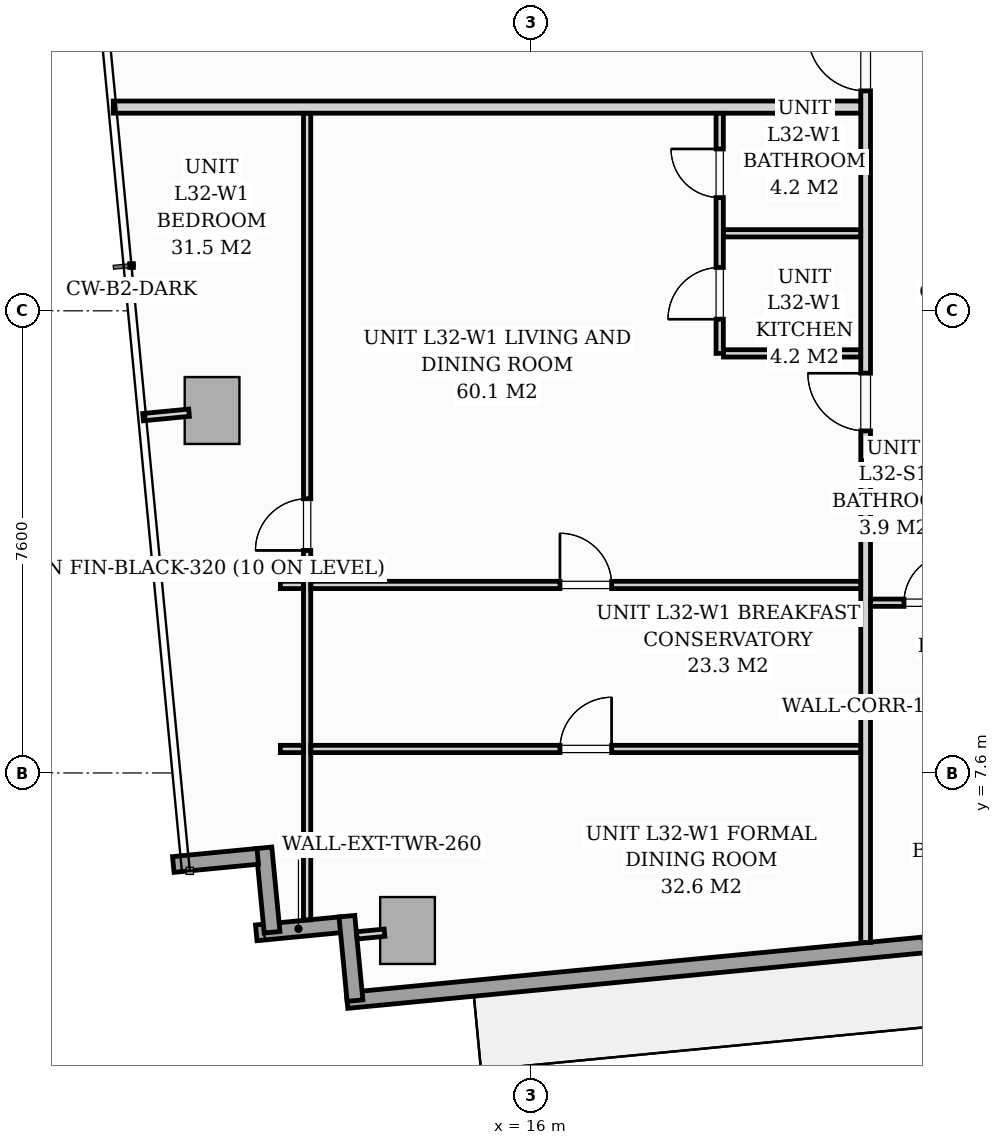
"""IFC4 building model, lengths in metres.
Left out: names, types, materials, properties, quantities, classifications, styles, units other than length and angle.
Written with IfcOpenShell. Run it as: python <this file> out.ifc"""

import sys

from ifc_helpers import new_model, si_unit, direction, frame, frame_2d, origin, origin_2d, place, context, subcontext, project, spatial, rectangle, extrude, source, transform, mapped, element, fill, save


model = new_model("IFC4")
c1 = context("Model", 3, precision=1e-05, world=origin(), true_north=direction((0.0, 1.0)))
c2 = subcontext(c1, "Body", "Model", "MODEL_VIEW")
j1 = project(units=[si_unit("LENGTHUNIT", "METRE"), si_unit("PLANEANGLEUNIT", "RADIAN")], contexts=[c1])
p1 = place(None, origin())
s1 = spatial("IfcSite", under=j1, at=p1, CompositionType="ELEMENT")
p2 = place(p1, origin())
s2 = spatial("IfcBuilding", under=s1, at=p2, CompositionType="ELEMENT")
p3 = place(p2, frame((0.0, 0.0, 113.0)))
s3 = spatial("IfcBuildingStorey", under=s2, at=p3, CompositionType="ELEMENT", Elevation=113.0)
m1 = source(origin(), c2, "Body", "SweptSolid", [
    extrude(rectangle(XDim=0.9, YDim=1.1, at=origin_2d()), origin(), (0.0, 0.0, 1.0), 3.196),
])
for number, where, z_axis, x_axis in (
    (1, (13.966, 5.01, 0.002), (0.0, 0.0, 1.0), (0.995, 0.096, 0.0)),
    (2, (10.752, 13.561, 0.002), (0.0, 0.0, 1.0), (0.995, 0.096, 0.0)),
):
    element("IfcColumn", number, at=place(p3, frame(where, z_axis=z_axis, x_axis=x_axis)), inside=s3, PredefinedType="COLUMN", context=c2, shape_type="MappedRepresentation", body=[
        mapped(m1, transform((0.0, 0.0, 0.0), scale=1.0)),
    ])
for number, where, z_axis, x_axis in (
    (3, (12.867, 5.104, 0.0), (0.0, 0.0, 1.0), (-0.995, -0.096, 0.0)),
    (4, (11.739, 4.981, 0.0), (0.0, 0.0, 1.0), (-0.096, 0.995, 0.0)),
):
    element("IfcWall", number, at=place(p3, frame(where, z_axis=z_axis, x_axis=x_axis)), inside=s3, PredefinedType="STANDARD", context=c2, shape_type="SweptSolid", body=[
        extrude(rectangle(XDim=1.395, YDim=0.26, at=frame_2d((0.697, 0.0))), origin(), (0.0, 0.0, 1.0), 2.94),
    ])
p4 = place(p3, frame((11.503, 6.229, 0.0), z_axis=(0.0, 0.0, 1.0), x_axis=(-0.995391056452, -0.09589913835, 0.0)))
e5 = element("IfcWall", 5, at=p4, inside=s3, PredefinedType="STANDARD", context=c2, shape_type="SweptSolid", body=[
    extrude(rectangle(XDim=1.395, YDim=0.26, at=frame_2d((0.698, 0.0))), origin(), (0.0, 0.0, 1.0), 2.94),
])
p5 = place(p3, frame((31.994, 5.69, 0.0), z_axis=(0.0, 0.0, 1.0), x_axis=(-0.995396521236, -0.095842399342, 0.0)))
e6 = element("IfcWall", 6, at=p5, inside=s3, PredefinedType="STANDARD", context=c2, shape_type="SweptSolid", body=[
    extrude(rectangle(XDim=19.11, YDim=0.26, at=frame_2d((9.555, 0.0))), origin(), (0.0, 0.0, 1.0), 2.94),
])
p6 = place(p5, frame((7.77, 0.0, 0.0)))
e7 = element("IfcOpeningElement", 7, at=p6, cuts=e6, PredefinedType="OPENING", context=c2, shape_type="SweptSolid", body=[
    extrude(rectangle(XDim=1.8, YDim=2.06, at=frame_2d((0.9, 1.03))), frame((0.0, 0.14, 0.0), z_axis=(0.0, -1.0, 0.0), x_axis=(1.0, 0.0, 0.0)), (0.0, 0.0, 1.0), 0.28),
])
p7 = place(p5, frame((2.5, 0.0, 0.65)))
e8 = element("IfcOpeningElement", 8, at=p7, cuts=e6, PredefinedType="OPENING", context=c2, shape_type="SweptSolid", body=[
    extrude(rectangle(XDim=1.6, YDim=1.5, at=frame_2d((0.8, 0.75))), frame((0.0, 0.14, 0.0), z_axis=(0.0, -1.0, 0.0), x_axis=(1.0, 0.0, 0.0)), (0.0, 0.0, 1.0), 0.28),
])
p8 = place(p3, frame((13.103, 3.856, 0.0), z_axis=(0.0, 0.0, 1.0), x_axis=(-0.09589913835, 0.995391056452, 0.0)))
e9 = element("IfcWall", 9, at=p8, inside=s3, PredefinedType="STANDARD", context=c2, shape_type="SweptSolid", body=[
    extrude(rectangle(XDim=1.395, YDim=0.26, at=frame_2d((0.698, 0.0))), origin(), (0.0, 0.0, 1.0), 2.94),
])
p9 = place(p3, frame((21.5, 12.65, 0.0), z_axis=(0.0, 0.0, 1.0), x_axis=(1.0, 0.0, 0.0)))
e10 = element("IfcWall", 10, at=p9, inside=s3, PredefinedType="PARTITIONING", context=c2, shape_type="SweptSolid", body=[
    extrude(rectangle(XDim=26.2, YDim=0.16, at=frame_2d((13.1, 0.0))), origin(), (0.0, 0.0, 1.0), 2.94),
])
p10 = place(p9, frame((5.927, 0.0, 0.0)))
e11 = element("IfcOpeningElement", 11, at=p10, cuts=e10, PredefinedType="OPENING", context=c2, shape_type="SweptSolid", body=[
    extrude(rectangle(XDim=0.95, YDim=2.06, at=frame_2d((0.475, 1.03))), frame((0.0, 0.09, 0.0), z_axis=(0.0, -1.0, 0.0), x_axis=(1.0, 0.0, 0.0)), (0.0, 0.0, 1.0), 0.18),
])
p11 = place(p9, frame((10.575, 0.0, 0.0)))
e12 = element("IfcOpeningElement", 12, at=p11, cuts=e10, PredefinedType="OPENING", context=c2, shape_type="SweptSolid", body=[
    extrude(rectangle(XDim=0.95, YDim=2.06, at=frame_2d((0.475, 1.03))), frame((0.0, 0.09, 0.0), z_axis=(0.0, -1.0, 0.0), x_axis=(1.0, 0.0, 0.0)), (0.0, 0.0, 1.0), 0.18),
])
p12 = place(p9, frame((19.322, 0.0, 0.0)))
e13 = element("IfcOpeningElement", 13, at=p12, cuts=e10, PredefinedType="OPENING", context=c2, shape_type="SweptSolid", body=[
    extrude(rectangle(XDim=0.95, YDim=2.06, at=frame_2d((0.475, 1.03))), frame((0.0, 0.09, 0.0), z_axis=(0.0, -1.0, 0.0), x_axis=(1.0, 0.0, 0.0)), (0.0, 0.0, 1.0), 0.18),
])
p13 = place(p3, frame((21.5, 4.812, 0.0), z_axis=(0.0, 0.0, 1.0), x_axis=(0.0, 1.0, 0.0)))
e14 = element("IfcWall", 14, at=p13, inside=s3, PredefinedType="PARTITIONING", context=c2, shape_type="SweptSolid", body=[
    extrude(rectangle(XDim=7.756, YDim=0.16, at=frame_2d((3.878, 0.0))), origin(), (0.0, 0.0, 1.0), 2.94),
])
p14 = place(p3, frame((21.5, 12.732, 0.0), z_axis=(0.0, 0.0, 1.0), x_axis=(0.0, 1.0, 0.0)))
e15 = element("IfcWall", 15, at=p14, inside=s3, PredefinedType="PARTITIONING", context=c2, shape_type="SweptSolid", body=[
    extrude(rectangle(XDim=11.647, YDim=0.16, at=frame_2d((5.823, 0.0))), origin(), (0.0, 0.0, 1.0), 2.94),
])
p15 = place(p14, frame((0.493, 0.0, 0.0)))
e16 = element("IfcOpeningElement", 16, at=p15, cuts=e15, PredefinedType="OPENING", context=c2, shape_type="SweptSolid", body=[
    extrude(rectangle(XDim=0.95, YDim=2.06, at=frame_2d((0.475, 1.03))), frame((0.0, 0.09, 0.0), z_axis=(0.0, -1.0, 0.0), x_axis=(1.0, 0.0, 0.0)), (0.0, 0.0, 1.0), 0.18),
])
p16 = place(p14, frame((6.085, 0.0, 0.0)))
e17 = element("IfcOpeningElement", 17, at=p16, cuts=e15, PredefinedType="OPENING", context=c2, shape_type="SweptSolid", body=[
    extrude(rectangle(XDim=0.95, YDim=2.06, at=frame_2d((0.475, 1.03))), frame((0.0, 0.09, 0.0), z_axis=(0.0, -1.0, 0.0), x_axis=(1.0, 0.0, 0.0)), (0.0, 0.0, 1.0), 0.18),
])
p17 = place(p3, frame((21.582, 10.4, 0.0), z_axis=(0.0, 0.0, 1.0), x_axis=(1.0, 0.0, 0.0)))
e18 = element("IfcWall", 18, at=p17, inside=s3, PredefinedType="PARTITIONING", context=c2, shape_type="SweptSolid", body=[
    extrude(rectangle(XDim=4.098, YDim=0.12, at=frame_2d((2.049, 0.0))), origin(), (0.0, 0.0, 1.0), 2.94),
])
p18 = place(p17, frame((0.548, 0.0, 0.0)))
e19 = element("IfcOpeningElement", 19, at=p18, cuts=e18, PredefinedType="OPENING", context=c2, shape_type="SweptSolid", body=[
    extrude(rectangle(XDim=0.8, YDim=2.02, at=frame_2d((0.4, 1.01))), frame((0.0, 0.07, 0.0), z_axis=(0.0, -1.0, 0.0), x_axis=(1.0, 0.0, 0.0)), (0.0, 0.0, 1.0), 0.14),
])
p19 = place(p17, frame((2.573, 0.0, 0.0)))
e20 = element("IfcOpeningElement", 20, at=p19, cuts=e18, PredefinedType="OPENING", context=c2, shape_type="SweptSolid", body=[
    extrude(rectangle(XDim=0.85, YDim=2.05, at=frame_2d((0.425, 1.025))), frame((0.0, 0.07, 0.0), z_axis=(0.0, -1.0, 0.0), x_axis=(1.0, 0.0, 0.0)), (0.0, 0.0, 1.0), 0.14),
])
p20 = place(p3, frame((9.126, 18.55, 0.0), z_axis=(0.0, 0.0, 1.0), x_axis=(1.0, 0.0, 0.0)))
e21 = element("IfcWall", 21, at=p20, inside=s3, PredefinedType="PARTITIONING", context=c2, shape_type="SweptSolid", body=[
    extrude(rectangle(XDim=12.292, YDim=0.2, at=frame_2d((6.146, 0.0))), origin(), (0.0, 0.0, 1.0), 2.94),
])
p21 = place(p3, frame((19.1, 14.5, 0.0), z_axis=(0.0, 0.0, 1.0), x_axis=(0.0, 1.0, 0.0)))
e22 = element("IfcWall", 22, at=p21, inside=s3, PredefinedType="PARTITIONING", context=c2, shape_type="SweptSolid", body=[
    extrude(rectangle(XDim=3.948, YDim=0.12, at=frame_2d((1.974, 0.0))), origin(), (0.0, 0.0, 1.0), 2.94),
])
p22 = place(p21, frame((0.563, 0.0, 0.0)))
e23 = element("IfcOpeningElement", 23, at=p22, cuts=e22, PredefinedType="OPENING", context=c2, shape_type="SweptSolid", body=[
    extrude(rectangle(XDim=0.85, YDim=2.05, at=frame_2d((0.425, 1.025))), frame((0.0, 0.07, 0.0), z_axis=(0.0, -1.0, 0.0), x_axis=(1.0, 0.0, 0.0)), (0.0, 0.0, 1.0), 0.14),
])
p23 = place(p21, frame((2.562, 0.0, 0.0)))
e24 = element("IfcOpeningElement", 24, at=p23, cuts=e22, PredefinedType="OPENING", context=c2, shape_type="SweptSolid", body=[
    extrude(rectangle(XDim=0.8, YDim=2.02, at=frame_2d((0.4, 1.01))), frame((0.0, 0.07, 0.0), z_axis=(0.0, -1.0, 0.0), x_axis=(1.0, 0.0, 0.0)), (0.0, 0.0, 1.0), 0.14),
])
for number, where, z_axis, x_axis in (
    (25, (19.162, 16.475, 0.0), (0.0, 0.0, 1.0), (1.0, 0.0, 0.0)),
    (26, (19.162, 14.5, 0.0), (0.0, 0.0, 1.0), (1.0, 0.0, 0.0)),
):
    element("IfcWall", number, at=place(p3, frame(where, z_axis=z_axis, x_axis=x_axis)), inside=s3, PredefinedType="PARTITIONING", context=c2, shape_type="SweptSolid", body=[
        extrude(rectangle(XDim=2.256, YDim=0.12, at=frame_2d((1.128, 0.0))), origin(), (0.0, 0.0, 1.0), 2.94),
    ])
p24 = place(p3, frame((12.315, 5.184, 0.0), z_axis=(0.0, 0.0, 1.0), x_axis=(0.0, 1.0, 0.0)))
e27 = element("IfcWall", 27, at=p24, inside=s3, PredefinedType="PARTITIONING", context=c2, shape_type="SweptSolid", body=[
    extrude(rectangle(XDim=13.264, YDim=0.12, at=frame_2d((6.632, 0.0))), origin(), (0.0, 0.0, 1.0), 2.94),
])
p25 = place(p24, frame((6.076, 0.0, 0.0)))
e28 = element("IfcOpeningElement", 28, at=p25, cuts=e27, PredefinedType="OPENING", context=c2, shape_type="SweptSolid", body=[
    extrude(rectangle(XDim=0.85, YDim=2.05, at=frame_2d((0.425, 1.025))), frame((0.0, 0.07, 0.0), z_axis=(0.0, -1.0, 0.0), x_axis=(1.0, 0.0, 0.0)), (0.0, 0.0, 1.0), 0.14),
])
p26 = place(p3, frame((11.875, 7.995, 0.0), z_axis=(0.0, 0.0, 1.0), x_axis=(1.0, 0.0, 0.0)))
e29 = element("IfcWall", 29, at=p26, inside=s3, PredefinedType="PARTITIONING", context=c2, shape_type="SweptSolid", body=[
    extrude(rectangle(XDim=0.378, YDim=0.12, at=frame_2d((0.189, 0.0))), origin(), (0.0, 0.0, 1.0), 2.94),
])
p27 = place(p3, frame((12.377, 7.995, 0.0), z_axis=(0.0, 0.0, 1.0), x_axis=(1.0, 0.0, 0.0)))
e30 = element("IfcWall", 30, at=p27, inside=s3, PredefinedType="PARTITIONING", context=c2, shape_type="SweptSolid", body=[
    extrude(rectangle(XDim=9.041, YDim=0.12, at=frame_2d((4.521, 0.0))), origin(), (0.0, 0.0, 1.0), 2.94),
])
p28 = place(p27, frame((4.096, 0.0, 0.0)))
e31 = element("IfcOpeningElement", 31, at=p28, cuts=e30, PredefinedType="OPENING", context=c2, shape_type="SweptSolid", body=[
    extrude(rectangle(XDim=0.85, YDim=2.05, at=frame_2d((0.425, 1.025))), frame((0.0, 0.07, 0.0), z_axis=(0.0, -1.0, 0.0), x_axis=(1.0, 0.0, 0.0)), (0.0, 0.0, 1.0), 0.14),
])
p29 = place(p3, frame((11.875, 10.692, 0.0), z_axis=(0.0, 0.0, 1.0), x_axis=(1.0, 0.0, 0.0)))
e32 = element("IfcWall", 32, at=p29, inside=s3, PredefinedType="PARTITIONING", context=c2, shape_type="SweptSolid", body=[
    extrude(rectangle(XDim=0.378, YDim=0.12, at=frame_2d((0.189, 0.0))), origin(), (0.0, 0.0, 1.0), 2.94),
])
p30 = place(p3, frame((12.377, 10.692, 0.0), z_axis=(0.0, 0.0, 1.0), x_axis=(1.0, 0.0, 0.0)))
e33 = element("IfcWall", 33, at=p30, inside=s3, PredefinedType="PARTITIONING", context=c2, shape_type="SweptSolid", body=[
    extrude(rectangle(XDim=9.041, YDim=0.12, at=frame_2d((4.521, 0.0))), origin(), (0.0, 0.0, 1.0), 2.94),
])
p31 = place(p30, frame((4.096, 0.0, 0.0)))
e34 = element("IfcOpeningElement", 34, at=p31, cuts=e33, PredefinedType="OPENING", context=c2, shape_type="SweptSolid", body=[
    extrude(rectangle(XDim=0.85, YDim=2.05, at=frame_2d((0.425, 1.025))), frame((0.0, 0.07, 0.0), z_axis=(0.0, -1.0, 0.0), x_axis=(1.0, 0.0, 0.0)), (0.0, 0.0, 1.0), 0.14),
])
p32 = place(p3, frame((13.588, 4.973, 0.0), z_axis=(0.0, 0.0, 1.0), x_axis=(-0.995435366701, -0.095438098896, 0.0)))
e35 = element("IfcWall", 35, at=p32, inside=s3, PredefinedType="PARTITIONING", context=c2, shape_type="SweptSolid", body=[
    extrude(rectangle(XDim=0.458, YDim=0.12, at=frame_2d((0.229, 0.0))), origin(), (0.0, 0.0, 1.0), 2.94),
])
p33 = place(p3, frame((10.373, 13.524, 0.0), z_axis=(0.0, 0.0, 1.0), x_axis=(-0.995377786728, -0.096036772582, 0.0)))
e36 = element("IfcWall", 36, at=p33, inside=s3, PredefinedType="PARTITIONING", context=c2, shape_type="SweptSolid", body=[
    extrude(rectangle(XDim=0.76, YDim=0.12, at=frame_2d((0.38, 0.0))), origin(), (0.0, 0.0, 1.0), 2.94),
])
m2 = source(origin(), c2, "Body", "SweptSolid", [
    extrude(rectangle(XDim=0.8, YDim=2.02, at=frame_2d((0.4, 1.01))), frame((0.0, 0.025, 0.0), z_axis=(0.0, -1.0, 0.0), x_axis=(1.0, 0.0, 0.0)), (0.0, 0.0, 1.0), 0.05),
])
p34 = place(p18, origin())
e37 = element("IfcDoor", 37, at=p34, inside=s3, OperationType="SINGLE_SWING_RIGHT", PredefinedType="DOOR", context=c2, shape_type="MappedRepresentation", body=[
    mapped(m2, transform((0.0, 0.0, 0.0), scale=1.0)),
])
fill(e19, e37)
m3 = source(origin(), c2, "Body", "SweptSolid", [
    extrude(rectangle(XDim=0.95, YDim=2.06, at=frame_2d((0.475, 1.03))), frame((0.0, 0.025, 0.0), z_axis=(0.0, -1.0, 0.0), x_axis=(1.0, 0.0, 0.0)), (0.0, 0.0, 1.0), 0.05),
])
p35 = place(p15, origin())
e38 = element("IfcDoor", 38, at=p35, inside=s3, OperationType="SINGLE_SWING_RIGHT", PredefinedType="DOOR", context=c2, shape_type="MappedRepresentation", body=[
    mapped(m3, transform((0.0, 0.0, 0.0), scale=1.0)),
])
fill(e16, e38)
m4 = source(origin(), c2, "Body", "SweptSolid", [
    extrude(rectangle(XDim=0.85, YDim=2.05, at=frame_2d((0.425, 1.025))), frame((0.0, 0.025, 0.0), z_axis=(0.0, -1.0, 0.0), x_axis=(1.0, 0.0, 0.0)), (0.0, 0.0, 1.0), 0.05),
])
p36 = place(p22, origin())
e39 = element("IfcDoor", 39, at=p36, inside=s3, OperationType="SINGLE_SWING_LEFT", PredefinedType="DOOR", context=c2, shape_type="MappedRepresentation", body=[
    mapped(m4, transform((0.0, 0.0, 0.0), scale=1.0)),
])
fill(e23, e39)
p37 = place(p23, origin())
e40 = element("IfcDoor", 40, at=p37, inside=s3, OperationType="SINGLE_SWING_RIGHT", PredefinedType="DOOR", context=c2, shape_type="MappedRepresentation", body=[
    mapped(m2, transform((0.0, 0.0, 0.0), scale=1.0)),
])
fill(e24, e40)
p38 = place(p25, origin())
e41 = element("IfcDoor", 41, at=p38, inside=s3, OperationType="SINGLE_SWING_LEFT", PredefinedType="DOOR", context=c2, shape_type="MappedRepresentation", body=[
    mapped(m4, transform((0.0, 0.0, 0.0), scale=1.0)),
])
fill(e28, e41)
p39 = place(p28, origin())
e42 = element("IfcDoor", 42, at=p39, inside=s3, OperationType="SINGLE_SWING_RIGHT", PredefinedType="DOOR", context=c2, shape_type="MappedRepresentation", body=[
    mapped(m4, transform((0.0, 0.0, 0.0), scale=1.0)),
])
fill(e31, e42)
p40 = place(p31, origin())
e43 = element("IfcDoor", 43, at=p40, inside=s3, OperationType="SINGLE_SWING_LEFT", PredefinedType="DOOR", context=c2, shape_type="MappedRepresentation", body=[
    mapped(m4, transform((0.0, 0.0, 0.0), scale=1.0)),
])
fill(e34, e43)
p41 = place(p16, origin())
e44 = element("IfcDoor", 44, at=p41, inside=s3, OperationType="SINGLE_SWING_RIGHT", PredefinedType="DOOR", context=c2, shape_type="MappedRepresentation", body=[
    mapped(m3, transform((0.0, 0.0, 0.0), scale=1.0)),
])
fill(e17, e44)
save(model, sys.argv[1])
